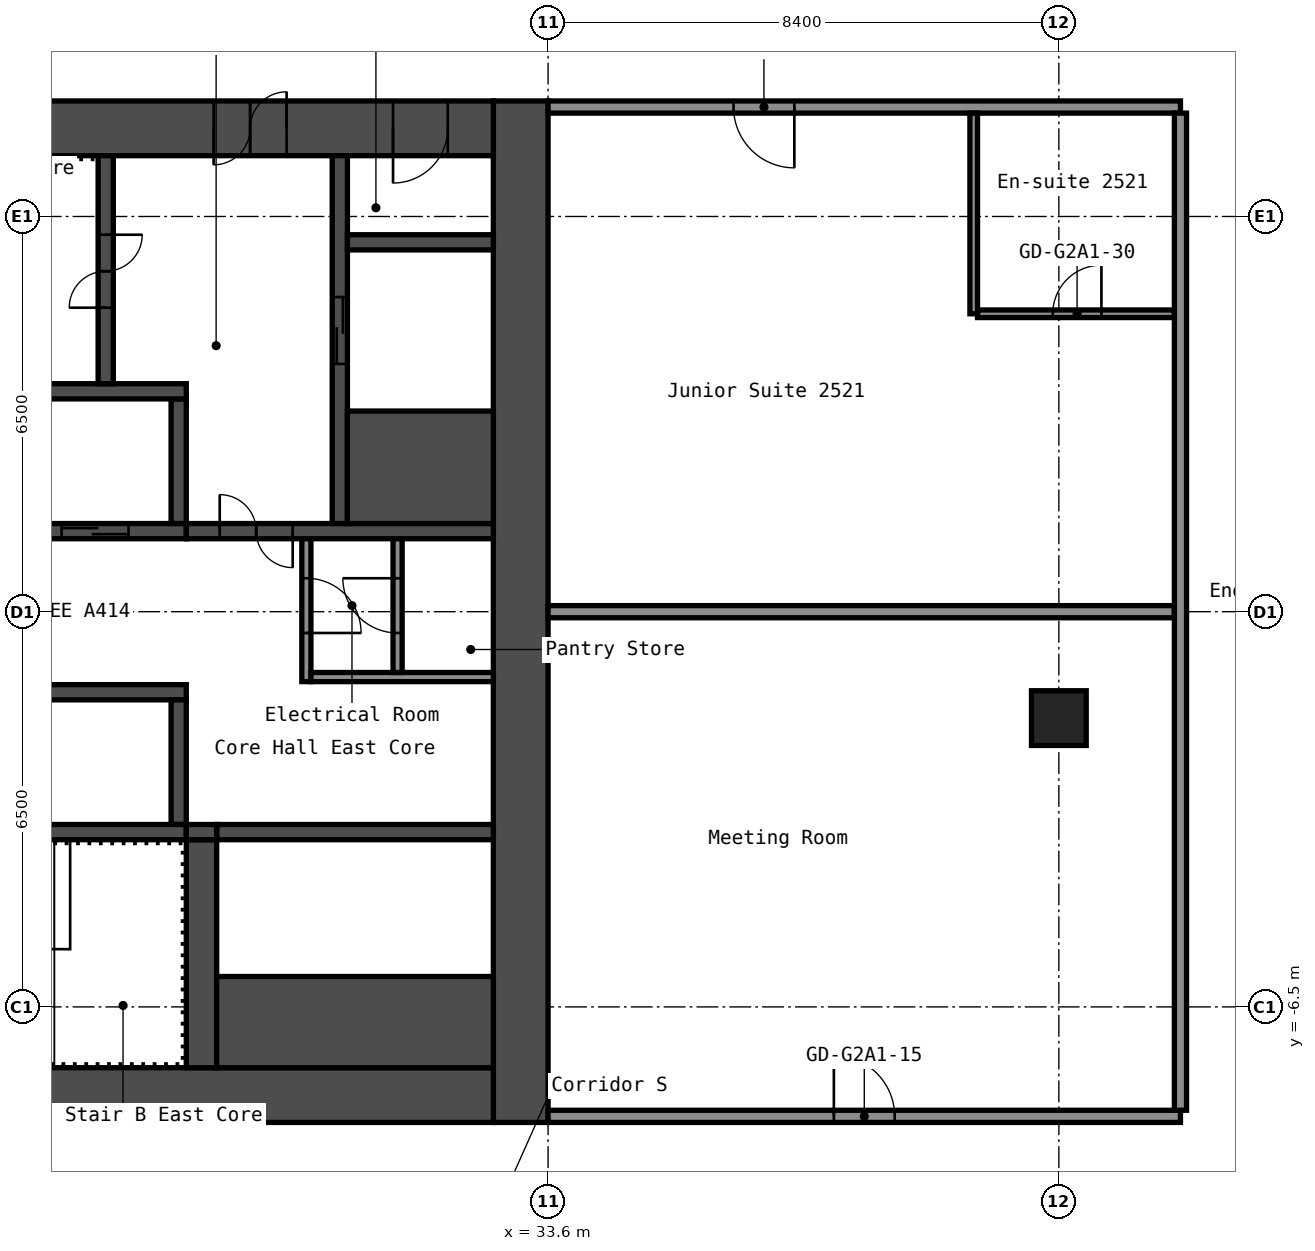
"""IFC4 building model, lengths in metres.
Left out: names, types, materials, properties, quantities, classifications, styles, units other than length and angle.
Written with IfcOpenShell. Run it as: python <this file> out.ifc"""

import sys

from ifc_helpers import new_model, si_unit, direction, frame, frame_2d, origin, origin_2d, place, context, subcontext, project, spatial, rectangle, hollow_rectangle, extrude, element, fill, save


model = new_model("IFC4")
c1 = context("Model", 3, precision=1e-05, world=origin(), true_north=direction((0.0, 1.0)))
c2 = subcontext(c1, "Body", "Model", "MODEL_VIEW")
j1 = project(units=[si_unit("LENGTHUNIT", "METRE"), si_unit("PLANEANGLEUNIT", "RADIAN")], contexts=[c1])
p1 = place(None, origin())
s1 = spatial("IfcSite", under=j1, at=p1, CompositionType="ELEMENT")
p2 = place(p1, origin())
s2 = spatial("IfcBuilding", under=s1, at=p2, CompositionType="ELEMENT")
p3 = place(p2, frame((0.0, 0.0, 91.4)))
s3 = spatial("IfcBuildingStorey", under=s2, at=p3, CompositionType="ELEMENT", Elevation=91.4)
p4 = place(p3, frame((42.0, -1.75, 0.0), z_axis=(0.0, 0.0, 1.0), x_axis=(1.0, 0.0, 0.0)))
e1 = element("IfcColumn", 1, at=p4, inside=s3, PredefinedType="COLUMN", context=c2, shape_type="SweptSolid", body=[
    extrude(hollow_rectangle(XDim=0.9, YDim=0.9, WallThickness=0.036, at=origin_2d()), origin(), (0.0, 0.0, 1.0), 2.8),
])
p5 = place(p3, frame((33.15, -8.4, 0.0), z_axis=(0.0, 0.0, 1.0), x_axis=(0.0, 1.0, 0.0)))
e2 = element("IfcWall", 2, at=p5, inside=s3, PredefinedType="SHEAR", context=c2, shape_type="SweptSolid", body=[
    extrude(rectangle(XDim=16.8, YDim=0.9, at=frame_2d((8.4, 0.0))), origin(), (0.0, 0.0, 1.0), 2.8),
])
p6 = place(p3, frame((17.7, 7.95, 0.0), z_axis=(0.0, 0.0, 1.0), x_axis=(1.0, 0.0, 0.0)))
e3 = element("IfcWall", 3, at=p6, inside=s3, PredefinedType="SHEAR", context=c2, shape_type="SweptSolid", body=[
    extrude(rectangle(XDim=15.0, YDim=0.9, at=frame_2d((7.5, 0.0))), origin(), (0.0, 0.0, 1.0), 2.8),
])
p7 = place(p6, frame((10.4, 0.0, 0.0)))
e4 = element("IfcOpeningElement", 4, at=p7, cuts=e3, PredefinedType="OPENING", context=c2, shape_type="SweptSolid", body=[
    extrude(rectangle(XDim=1.2, YDim=2.1, at=frame_2d((0.6, 1.05))), frame((0.0, 0.46, 0.0), z_axis=(0.0, -1.0, 0.0), x_axis=(1.0, 0.0, 0.0)), (0.0, 0.0, 1.0), 0.92),
])
p8 = place(p6, frame((13.35, 0.0, 0.0)))
e5 = element("IfcOpeningElement", 5, at=p8, cuts=e3, PredefinedType="OPENING", context=c2, shape_type="SweptSolid", body=[
    extrude(rectangle(XDim=0.9, YDim=2.1, at=frame_2d((0.45, 1.05))), frame((0.0, 0.46, 0.0), z_axis=(0.0, -1.0, 0.0), x_axis=(1.0, 0.0, 0.0)), (0.0, 0.0, 1.0), 0.92),
])
p9 = place(p3, frame((17.7, -7.95, 0.0), z_axis=(0.0, 0.0, 1.0), x_axis=(1.0, 0.0, 0.0)))
e6 = element("IfcWall", 6, at=p9, inside=s3, PredefinedType="SHEAR", context=c2, shape_type="SweptSolid", body=[
    extrude(rectangle(XDim=15.0, YDim=0.9, at=frame_2d((7.5, 0.0))), origin(), (0.0, 0.0, 1.0), 2.8),
])
p10 = place(p9, frame((2.55, 0.0, 0.0)))
e7 = element("IfcOpeningElement", 7, at=p10, cuts=e6, PredefinedType="OPENING", context=c2, shape_type="SweptSolid", body=[
    extrude(rectangle(XDim=1.0, YDim=2.1, at=frame_2d((0.5, 1.05))), frame((0.0, 0.46, 0.0), z_axis=(0.0, -1.0, 0.0), x_axis=(1.0, 0.0, 0.0)), (0.0, 0.0, 1.0), 0.92),
])
p11 = place(p3, frame((20.15, 1.325, 0.0), z_axis=(0.0, 0.0, 1.0), x_axis=(1.0, 0.0, 0.0)))
e8 = element("IfcWall", 8, at=p11, inside=s3, PredefinedType="SHEAR", context=c2, shape_type="SweptSolid", body=[
    extrude(rectangle(XDim=7.5, YDim=0.25, at=frame_2d((3.75, 0.0))), origin(), (0.0, 0.0, 1.0), 2.8),
])
p12 = place(p11, frame((0.65, 0.0, 0.0)))
e9 = element("IfcOpeningElement", 9, at=p12, cuts=e8, PredefinedType="OPENING", context=c2, shape_type="SweptSolid", body=[
    extrude(rectangle(XDim=1.1, YDim=2.1, at=frame_2d((0.55, 1.05))), frame((0.0, 0.135, 0.0), z_axis=(0.0, -1.0, 0.0), x_axis=(1.0, 0.0, 0.0)), (0.0, 0.0, 1.0), 0.27),
])
p13 = place(p11, frame((3.05, 0.0, 0.0)))
e10 = element("IfcOpeningElement", 10, at=p13, cuts=e8, PredefinedType="OPENING", context=c2, shape_type="SweptSolid", body=[
    extrude(rectangle(XDim=1.1, YDim=2.1, at=frame_2d((0.55, 1.05))), frame((0.0, 0.135, 0.0), z_axis=(0.0, -1.0, 0.0), x_axis=(1.0, 0.0, 0.0)), (0.0, 0.0, 1.0), 0.27),
])
p14 = place(p11, frame((5.45, 0.0, 0.0)))
e11 = element("IfcOpeningElement", 11, at=p14, cuts=e8, PredefinedType="OPENING", context=c2, shape_type="SweptSolid", body=[
    extrude(rectangle(XDim=1.1, YDim=2.1, at=frame_2d((0.55, 1.05))), frame((0.0, 0.135, 0.0), z_axis=(0.0, -1.0, 0.0), x_axis=(1.0, 0.0, 0.0)), (0.0, 0.0, 1.0), 0.27),
])
p15 = place(p3, frame((27.525, 1.45, 0.0), z_axis=(0.0, 0.0, 1.0), x_axis=(0.0, 1.0, 0.0)))
e12 = element("IfcWall", 12, at=p15, inside=s3, PredefinedType="SHEAR", context=c2, shape_type="SweptSolid", body=[
    extrude(rectangle(XDim=2.05, YDim=0.25, at=frame_2d((1.025, 0.0))), origin(), (0.0, 0.0, 1.0), 2.8),
])
p16 = place(p3, frame((20.15, 3.625, 0.0), z_axis=(0.0, 0.0, 1.0), x_axis=(1.0, 0.0, 0.0)))
e13 = element("IfcWall", 13, at=p16, inside=s3, PredefinedType="SHEAR", context=c2, shape_type="SweptSolid", body=[
    extrude(rectangle(XDim=7.5, YDim=0.25, at=frame_2d((3.75, 0.0))), origin(), (0.0, 0.0, 1.0), 2.8),
])
p17 = place(p3, frame((26.325, 3.75, 0.0), z_axis=(0.0, 0.0, 1.0), x_axis=(0.0, 1.0, 0.0)))
e14 = element("IfcWall", 14, at=p17, inside=s3, PredefinedType="SHEAR", context=c2, shape_type="SweptSolid", body=[
    extrude(rectangle(XDim=3.75, YDim=0.25, at=frame_2d((1.875, 0.0))), origin(), (0.0, 0.0, 1.0), 2.8),
])
p18 = place(p17, frame((1.25, 0.0, 0.0)))
e15 = element("IfcOpeningElement", 15, at=p18, cuts=e14, PredefinedType="OPENING", context=c2, shape_type="SweptSolid", body=[
    extrude(rectangle(XDim=1.2, YDim=2.1, at=frame_2d((0.6, 1.05))), frame((0.0, 0.135, 0.0), z_axis=(0.0, -1.0, 0.0), x_axis=(1.0, 0.0, 0.0)), (0.0, 0.0, 1.0), 0.27),
])
p19 = place(p3, frame((27.65, 1.325, 0.0), z_axis=(0.0, 0.0, 1.0), x_axis=(1.0, 0.0, 0.0)))
e16 = element("IfcWall", 16, at=p19, inside=s3, PredefinedType="SHEAR", context=c2, shape_type="SweptSolid", body=[
    extrude(rectangle(XDim=5.05, YDim=0.25, at=frame_2d((2.525, 0.0))), origin(), (0.0, 0.0, 1.0), 2.8),
])
p20 = place(p19, frame((0.55, 0.0, 0.0)))
e17 = element("IfcOpeningElement", 17, at=p20, cuts=e16, PredefinedType="OPENING", context=c2, shape_type="SweptSolid", body=[
    extrude(rectangle(XDim=1.2, YDim=2.1, at=frame_2d((0.6, 1.05))), frame((0.0, 0.135, 0.0), z_axis=(0.0, -1.0, 0.0), x_axis=(1.0, 0.0, 0.0)), (0.0, 0.0, 1.0), 0.27),
])
p21 = place(p3, frame((30.175, 1.45, 0.0), z_axis=(0.0, 0.0, 1.0), x_axis=(0.0, 1.0, 0.0)))
e18 = element("IfcWall", 18, at=p21, inside=s3, PredefinedType="SHEAR", context=c2, shape_type="SweptSolid", body=[
    extrude(rectangle(XDim=6.05, YDim=0.25, at=frame_2d((3.025, 0.0))), origin(), (0.0, 0.0, 1.0), 2.8),
])
p22 = place(p21, frame((2.625, 0.0, 0.0)))
e19 = element("IfcOpeningElement", 19, at=p22, cuts=e18, PredefinedType="OPENING", context=c2, shape_type="SweptSolid", body=[
    extrude(rectangle(XDim=1.1, YDim=2.1, at=frame_2d((0.55, 1.05))), frame((0.0, 0.135, 0.0), z_axis=(0.0, -1.0, 0.0), x_axis=(1.0, 0.0, 0.0)), (0.0, 0.0, 1.0), 0.27),
])
p23 = place(p3, frame((30.3, 2.375, 0.0), z_axis=(0.0, 0.0, 1.0), x_axis=(1.0, 0.0, 0.0)))
e20 = element("IfcWall", 20, at=p23, inside=s3, PredefinedType="SHEAR", context=c2, shape_type="SweptSolid", body=[
    extrude(rectangle(XDim=2.4, YDim=1.85, at=frame_2d((1.2, 0.0))), origin(), (0.0, 0.0, 1.0), 2.8),
])
p24 = place(p3, frame((30.3, 6.075, 0.0), z_axis=(0.0, 0.0, 1.0), x_axis=(1.0, 0.0, 0.0)))
e21 = element("IfcWall", 21, at=p24, inside=s3, PredefinedType="SHEAR", context=c2, shape_type="SweptSolid", body=[
    extrude(rectangle(XDim=2.4, YDim=0.25, at=frame_2d((1.2, 0.0))), origin(), (0.0, 0.0, 1.0), 2.8),
])
p25 = place(p3, frame((20.15, -1.325, 0.0), z_axis=(0.0, 0.0, 1.0), x_axis=(1.0, 0.0, 0.0)))
e22 = element("IfcWall", 22, at=p25, inside=s3, PredefinedType="SHEAR", context=c2, shape_type="SweptSolid", body=[
    extrude(rectangle(XDim=7.5, YDim=0.25, at=frame_2d((3.75, 0.0))), origin(), (0.0, 0.0, 1.0), 2.8),
])
p26 = place(p3, frame((27.525, -3.5, 0.0), z_axis=(0.0, 0.0, 1.0), x_axis=(0.0, 1.0, 0.0)))
e23 = element("IfcWall", 23, at=p26, inside=s3, PredefinedType="SHEAR", context=c2, shape_type="SweptSolid", body=[
    extrude(rectangle(XDim=2.05, YDim=0.25, at=frame_2d((1.025, 0.0))), origin(), (0.0, 0.0, 1.0), 2.8),
])
p27 = place(p3, frame((20.15, -3.625, 0.0), z_axis=(0.0, 0.0, 1.0), x_axis=(1.0, 0.0, 0.0)))
e24 = element("IfcWall", 24, at=p27, inside=s3, PredefinedType="SHEAR", context=c2, shape_type="SweptSolid", body=[
    extrude(rectangle(XDim=7.5, YDim=0.25, at=frame_2d((3.75, 0.0))), origin(), (0.0, 0.0, 1.0), 2.8),
])
p28 = place(p3, frame((27.9, -7.5, 0.0), z_axis=(0.0, 0.0, 1.0), x_axis=(0.0, 1.0, 0.0)))
e25 = element("IfcWall", 25, at=p28, inside=s3, PredefinedType="SHEAR", context=c2, shape_type="SweptSolid", body=[
    extrude(rectangle(XDim=3.75, YDim=0.5, at=frame_2d((1.875, 0.0))), origin(), (0.0, 0.0, 1.0), 2.8),
])
p29 = place(p3, frame((28.15, -3.625, 0.0), z_axis=(0.0, 0.0, 1.0), x_axis=(1.0, 0.0, 0.0)))
e26 = element("IfcWall", 26, at=p29, inside=s3, PredefinedType="SHEAR", context=c2, shape_type="SweptSolid", body=[
    extrude(rectangle(XDim=4.55, YDim=0.25, at=frame_2d((2.275, 0.0))), origin(), (0.0, 0.0, 1.0), 2.8),
])
p30 = place(p3, frame((28.15, -6.75, 0.0), z_axis=(0.0, 0.0, 1.0), x_axis=(1.0, 0.0, 0.0)))
e27 = element("IfcWall", 27, at=p30, inside=s3, PredefinedType="SHEAR", context=c2, shape_type="SweptSolid", body=[
    extrude(rectangle(XDim=4.55, YDim=1.5, at=frame_2d((2.275, 0.0))), origin(), (0.0, 0.0, 1.0), 2.8),
])
p31 = place(p3, frame((27.65, -3.625, 0.0), z_axis=(0.0, 0.0, 1.0), x_axis=(1.0, 0.0, 0.0)))
e28 = element("IfcWall", 28, at=p31, inside=s3, PredefinedType="SHEAR", context=c2, shape_type="SweptSolid", body=[
    extrude(rectangle(XDim=0.5, YDim=0.25, at=frame_2d((0.25, 0.0))), origin(), (0.0, 0.0, 1.0), 2.8),
])
p32 = place(p3, frame((29.625, -1.15, 0.0), z_axis=(0.0, 0.0, 1.0), x_axis=(0.0, 1.0, 0.0)))
e29 = element("IfcWall", 29, at=p32, inside=s3, PredefinedType="PARTITIONING", context=c2, shape_type="SweptSolid", body=[
    extrude(rectangle(XDim=2.35, YDim=0.15, at=frame_2d((1.175, 0.0))), origin(), (0.0, 0.0, 1.0), 2.8),
])
p33 = place(p32, frame((0.8, 0.0, 0.0)))
e30 = element("IfcOpeningElement", 30, at=p33, cuts=e29, PredefinedType="OPENING", context=c2, shape_type="SweptSolid", body=[
    extrude(rectangle(XDim=0.9, YDim=2.1, at=frame_2d((0.45, 1.05))), frame((0.0, 0.085, 0.0), z_axis=(0.0, -1.0, 0.0), x_axis=(1.0, 0.0, 0.0)), (0.0, 0.0, 1.0), 0.17),
])
p34 = place(p3, frame((29.7, -1.075, 0.0), z_axis=(0.0, 0.0, 1.0), x_axis=(1.0, 0.0, 0.0)))
e31 = element("IfcWall", 31, at=p34, inside=s3, PredefinedType="PARTITIONING", context=c2, shape_type="SweptSolid", body=[
    extrude(rectangle(XDim=3.0, YDim=0.15, at=frame_2d((1.5, 0.0))), origin(), (0.0, 0.0, 1.0), 2.8),
])
p35 = place(p3, frame((31.125, -1.0, 0.0), z_axis=(0.0, 0.0, 1.0), x_axis=(0.0, 1.0, 0.0)))
e32 = element("IfcWall", 32, at=p35, inside=s3, PredefinedType="PARTITIONING", context=c2, shape_type="SweptSolid", body=[
    extrude(rectangle(XDim=2.2, YDim=0.15, at=frame_2d((1.1, 0.0))), origin(), (0.0, 0.0, 1.0), 2.8),
])
p36 = place(p35, frame((0.65, 0.0, 0.0)))
e33 = element("IfcOpeningElement", 33, at=p36, cuts=e32, PredefinedType="OPENING", context=c2, shape_type="SweptSolid", body=[
    extrude(rectangle(XDim=0.9, YDim=2.1, at=frame_2d((0.45, 1.05))), frame((0.0, 0.085, 0.0), z_axis=(0.0, -1.0, 0.0), x_axis=(1.0, 0.0, 0.0)), (0.0, 0.0, 1.0), 0.17),
])
p37 = place(p3, frame((33.6, -8.3, 0.0), z_axis=(0.0, 0.0, 1.0), x_axis=(1.0, 0.0, 0.0)))
e34 = element("IfcWall", 34, at=p37, inside=s3, PredefinedType="PARTITIONING", context=c2, shape_type="SweptSolid", body=[
    extrude(rectangle(XDim=10.4, YDim=0.2, at=frame_2d((5.2, 0.0))), origin(), (0.0, 0.0, 1.0), 2.8),
])
p38 = place(p37, frame((4.7, 0.0, 0.0)))
e35 = element("IfcOpeningElement", 35, at=p38, cuts=e34, PredefinedType="OPENING", context=c2, shape_type="SweptSolid", body=[
    extrude(rectangle(XDim=1.0, YDim=2.1, at=frame_2d((0.5, 1.05))), frame((0.0, 0.11, 0.0), z_axis=(0.0, -1.0, 0.0), x_axis=(1.0, 0.0, 0.0)), (0.0, 0.0, 1.0), 0.22),
])
p39 = place(p3, frame((33.6, 0.0, 0.0), z_axis=(0.0, 0.0, 1.0), x_axis=(1.0, 0.0, 0.0)))
e36 = element("IfcWall", 36, at=p39, inside=s3, PredefinedType="PARTITIONING", context=c2, shape_type="SweptSolid", body=[
    extrude(rectangle(XDim=10.3, YDim=0.2, at=frame_2d((5.15, 0.0))), origin(), (0.0, 0.0, 1.0), 2.8),
])
p40 = place(p3, frame((40.663, 4.9, 0.0), z_axis=(0.0, 0.0, 1.0), x_axis=(1.0, 0.0, 0.0)))
e37 = element("IfcWall", 37, at=p40, inside=s3, PredefinedType="PARTITIONING", context=c2, shape_type="SweptSolid", body=[
    extrude(rectangle(XDim=3.237, YDim=0.125, at=frame_2d((1.619, 0.0))), origin(), (0.0, 0.0, 1.0), 2.8),
])
p41 = place(p40, frame((1.238, 0.0, 0.0)))
e38 = element("IfcOpeningElement", 38, at=p41, cuts=e37, PredefinedType="OPENING", context=c2, shape_type="SweptSolid", body=[
    extrude(rectangle(XDim=0.8, YDim=2.1, at=frame_2d((0.4, 1.05))), frame((0.0, 0.073, 0.0), z_axis=(0.0, -1.0, 0.0), x_axis=(1.0, 0.0, 0.0)), (0.0, 0.0, 1.0), 0.145),
])
p42 = place(p3, frame((33.6, 8.3, 0.0), z_axis=(0.0, 0.0, 1.0), x_axis=(1.0, 0.0, 0.0)))
e39 = element("IfcWall", 39, at=p42, inside=s3, PredefinedType="PARTITIONING", context=c2, shape_type="SweptSolid", body=[
    extrude(rectangle(XDim=10.4, YDim=0.2, at=frame_2d((5.2, 0.0))), origin(), (0.0, 0.0, 1.0), 2.8),
])
p43 = place(p42, frame((3.05, 0.0, 0.0)))
e40 = element("IfcOpeningElement", 40, at=p43, cuts=e39, PredefinedType="OPENING", context=c2, shape_type="SweptSolid", body=[
    extrude(rectangle(XDim=1.0, YDim=2.1, at=frame_2d((0.5, 1.05))), frame((0.0, 0.11, 0.0), z_axis=(0.0, -1.0, 0.0), x_axis=(1.0, 0.0, 0.0)), (0.0, 0.0, 1.0), 0.22),
])
p44 = place(p3, frame((40.6, 4.9, 0.0), z_axis=(0.0, 0.0, 1.0), x_axis=(0.0, 1.0, 0.0)))
e41 = element("IfcWall", 41, at=p44, inside=s3, PredefinedType="PARTITIONING", context=c2, shape_type="SweptSolid", body=[
    extrude(rectangle(XDim=3.3, YDim=0.125, at=frame_2d((1.65, 0.0))), origin(), (0.0, 0.0, 1.0), 2.8),
])
p45 = place(p3, frame((44.0, -8.2, 0.0), z_axis=(0.0, 0.0, 1.0), x_axis=(0.0, 1.0, 0.0)))
e42 = element("IfcWall", 42, at=p45, inside=s3, PredefinedType="PARTITIONING", context=c2, shape_type="SweptSolid", body=[
    extrude(rectangle(XDim=16.4, YDim=0.2, at=frame_2d((8.2, 0.0))), origin(), (0.0, 0.0, 1.0), 2.8),
])
p46 = place(p7, origin())
e43 = element("IfcDoor", 43, at=p46, inside=s3, OperationType="DOUBLE_DOOR_SINGLE_SWING", PredefinedType="DOOR", context=c2, shape_type="SweptSolid", body=[
    extrude(rectangle(XDim=1.2, YDim=2.1, at=frame_2d((0.6, 1.05))), frame((0.0, 0.025, 0.0), z_axis=(0.0, -1.0, 0.0), x_axis=(1.0, 0.0, 0.0)), (0.0, 0.0, 1.0), 0.05),
])
fill(e4, e43)
p47 = place(p8, origin())
e44 = element("IfcDoor", 44, at=p47, inside=s3, OperationType="SINGLE_SWING_LEFT", PredefinedType="DOOR", context=c2, shape_type="SweptSolid", body=[
    extrude(rectangle(XDim=0.9, YDim=2.1, at=frame_2d((0.45, 1.05))), frame((0.0, 0.025, 0.0), z_axis=(0.0, -1.0, 0.0), x_axis=(1.0, 0.0, 0.0)), (0.0, 0.0, 1.0), 0.05),
])
fill(e5, e44)
p48 = place(p18, origin())
e45 = element("IfcDoor", 45, at=p48, inside=s3, OperationType="DOUBLE_DOOR_SINGLE_SWING", PredefinedType="DOOR", context=c2, shape_type="SweptSolid", body=[
    extrude(rectangle(XDim=1.2, YDim=2.1, at=frame_2d((0.6, 1.05))), frame((0.0, 0.025, 0.0), z_axis=(0.0, -1.0, 0.0), x_axis=(1.0, 0.0, 0.0)), (0.0, 0.0, 1.0), 0.05),
])
fill(e15, e45)
p49 = place(p20, origin())
e46 = element("IfcDoor", 46, at=p49, inside=s3, OperationType="DOUBLE_DOOR_SINGLE_SWING", PredefinedType="DOOR", context=c2, shape_type="SweptSolid", body=[
    extrude(rectangle(XDim=1.2, YDim=2.1, at=frame_2d((0.6, 1.05))), frame((0.0, 0.025, 0.0), z_axis=(0.0, -1.0, 0.0), x_axis=(1.0, 0.0, 0.0)), (0.0, 0.0, 1.0), 0.05),
])
fill(e17, e46)
p50 = place(p33, origin())
e47 = element("IfcDoor", 47, at=p50, inside=s3, OperationType="SINGLE_SWING_LEFT", PredefinedType="DOOR", context=c2, shape_type="SweptSolid", body=[
    extrude(rectangle(XDim=0.9, YDim=2.1, at=frame_2d((0.45, 1.05))), frame((0.0, 0.025, 0.0), z_axis=(0.0, -1.0, 0.0), x_axis=(1.0, 0.0, 0.0)), (0.0, 0.0, 1.0), 0.05),
])
fill(e30, e47)
p51 = place(p36, origin())
e48 = element("IfcDoor", 48, at=p51, inside=s3, OperationType="SINGLE_SWING_LEFT", PredefinedType="DOOR", context=c2, shape_type="SweptSolid", body=[
    extrude(rectangle(XDim=0.9, YDim=2.1, at=frame_2d((0.45, 1.05))), frame((0.0, 0.025, 0.0), z_axis=(0.0, -1.0, 0.0), x_axis=(1.0, 0.0, 0.0)), (0.0, 0.0, 1.0), 0.05),
])
fill(e33, e48)
p52 = place(p14, origin())
e49 = element("IfcDoor", 49, at=p52, inside=s3, OperationType="DOUBLE_DOOR_SLIDING", PredefinedType="DOOR", context=c2, shape_type="SweptSolid", body=[
    extrude(rectangle(XDim=1.1, YDim=2.1, at=frame_2d((0.55, 1.05))), frame((0.0, 0.025, 0.0), z_axis=(0.0, -1.0, 0.0), x_axis=(1.0, 0.0, 0.0)), (0.0, 0.0, 1.0), 0.05),
])
fill(e11, e49)
p53 = place(p22, origin())
e50 = element("IfcDoor", 50, at=p53, inside=s3, OperationType="DOUBLE_DOOR_SLIDING", PredefinedType="DOOR", context=c2, shape_type="SweptSolid", body=[
    extrude(rectangle(XDim=1.1, YDim=2.1, at=frame_2d((0.55, 1.05))), frame((0.0, 0.025, 0.0), z_axis=(0.0, -1.0, 0.0), x_axis=(1.0, 0.0, 0.0)), (0.0, 0.0, 1.0), 0.05),
])
fill(e19, e50)
p54 = place(p38, origin())
e51 = element("IfcDoor", 51, at=p54, inside=s3, OperationType="SINGLE_SWING_RIGHT", PredefinedType="DOOR", context=c2, shape_type="SweptSolid", body=[
    extrude(rectangle(XDim=1.0, YDim=2.1, at=frame_2d((0.5, 1.05))), frame((0.0, 0.025, 0.0), z_axis=(0.0, -1.0, 0.0), x_axis=(1.0, 0.0, 0.0)), (0.0, 0.0, 1.0), 0.05),
])
fill(e35, e51)
p55 = place(p41, origin())
e52 = element("IfcDoor", 52, at=p55, inside=s3, OperationType="SINGLE_SWING_LEFT", PredefinedType="DOOR", context=c2, shape_type="SweptSolid", body=[
    extrude(rectangle(XDim=0.8, YDim=2.1, at=frame_2d((0.4, 1.05))), frame((0.0, 0.025, 0.0), z_axis=(0.0, -1.0, 0.0), x_axis=(1.0, 0.0, 0.0)), (0.0, 0.0, 1.0), 0.05),
])
fill(e38, e52)
p56 = place(p43, origin())
e53 = element("IfcDoor", 53, at=p56, inside=s3, OperationType="SINGLE_SWING_RIGHT", PredefinedType="DOOR", context=c2, shape_type="SweptSolid", body=[
    extrude(rectangle(XDim=1.0, YDim=2.1, at=frame_2d((0.5, 1.05))), frame((0.0, 0.025, 0.0), z_axis=(0.0, -1.0, 0.0), x_axis=(1.0, 0.0, 0.0)), (0.0, 0.0, 1.0), 0.05),
])
fill(e40, e53)
save(model, sys.argv[1])
